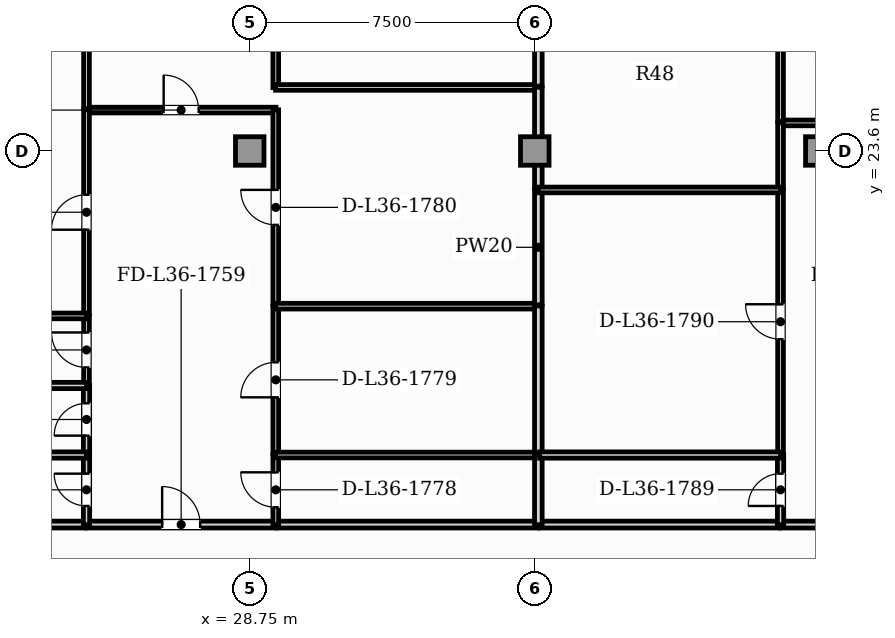
"""IFC4 building model, lengths in metres.
Left out: names, types, materials, properties, quantities, classifications, styles, units other than length and angle.
Written with IfcOpenShell. Run it as: python <this file> out.ifc"""

import sys

from ifc_helpers import new_model, si_unit, direction, frame, frame_2d, origin, origin_2d, place, context, subcontext, project, spatial, rectangle, extrude, element, fill, save


model = new_model("IFC4")
c1 = context("Model", 3, precision=1e-05, world=origin(), true_north=direction((0.0, 1.0)))
c2 = subcontext(c1, "Body", "Model", "MODEL_VIEW")
j1 = project(units=[si_unit("LENGTHUNIT", "METRE"), si_unit("PLANEANGLEUNIT", "RADIAN")], contexts=[c1])
p1 = place(None, origin())
s1 = spatial("IfcSite", under=j1, at=p1, CompositionType="ELEMENT")
p2 = place(p1, origin())
s2 = spatial("IfcBuilding", under=s1, at=p2, CompositionType="ELEMENT")
p3 = place(p2, frame((0.0, 0.0, 149.05)))
s3 = spatial("IfcBuildingStorey", under=s2, at=p3, CompositionType="ELEMENT", Elevation=149.05)
for number, where, z_axis, x_axis in (
    (1, (28.75, 23.6, 0.0), (0.0, 0.0, 1.0), (1.0, 0.0, 0.0)),
    (2, (36.25, 23.6, 0.0), (0.0, 0.0, 1.0), (1.0, 0.0, 0.0)),
    (3, (43.75, 23.6, 0.0), (0.0, 0.0, 1.0), (1.0, 0.0, 0.0)),
):
    element("IfcColumn", number, at=place(p3, frame(where, z_axis=z_axis, x_axis=x_axis)), inside=s3, PredefinedType="COLUMN", context=c2, shape_type="SweptSolid", body=[
        extrude(rectangle(XDim=0.75, YDim=0.75, at=origin_2d()), origin(), (0.0, 0.0, 1.0), 3.85),
    ])
p4 = place(p3, frame((24.45, 13.77, 0.0), z_axis=(0.0, 0.0, 1.0), x_axis=(1.0, 0.0, 0.0)))
e4 = element("IfcWall", 4, at=p4, inside=s3, PredefinedType="PARTITIONING", context=c2, shape_type="SweptSolid", body=[
    extrude(rectangle(XDim=4.99, YDim=0.18, at=frame_2d((2.495, 0.0))), origin(), (0.0, 0.0, 1.0), 3.63),
])
p5 = place(p4, frame((1.995, 0.0, 0.0)))
e5 = element("IfcOpeningElement", 5, at=p5, cuts=e4, PredefinedType="OPENING", context=c2, shape_type="SweptSolid", body=[
    extrude(rectangle(XDim=1.0, YDim=2.15, at=frame_2d((0.5, 1.075))), frame((0.0, 0.1, 0.0), z_axis=(0.0, -1.0, 0.0), x_axis=(1.0, 0.0, 0.0)), (0.0, 0.0, 1.0), 0.2),
])
p6 = place(p3, frame((17.385, 13.77, 0.0), z_axis=(0.0, 0.0, 1.0), x_axis=(1.0, 0.0, 0.0)))
e6 = element("IfcWall", 6, at=p6, inside=s3, PredefinedType="PARTITIONING", context=c2, shape_type="SweptSolid", body=[
    extrude(rectangle(XDim=7.035, YDim=0.18, at=frame_2d((3.518, 0.0))), origin(), (0.0, 0.0, 1.0), 3.63),
])
p7 = place(p3, frame((29.47, 13.77, 0.0), z_axis=(0.0, 0.0, 1.0), x_axis=(1.0, 0.0, 0.0)))
e7 = element("IfcWall", 7, at=p7, inside=s3, PredefinedType="PARTITIONING", context=c2, shape_type="SweptSolid", body=[
    extrude(rectangle(XDim=6.879, YDim=0.18, at=frame_2d((3.439, 0.0))), origin(), (0.0, 0.0, 1.0), 3.63),
])
p8 = place(p3, frame((42.712, 13.77, 0.0), z_axis=(0.0, 0.0, 1.0), x_axis=(1.0, 0.0, 0.0)))
e8 = element("IfcWall", 8, at=p8, inside=s3, PredefinedType="PARTITIONING", context=c2, shape_type="SweptSolid", body=[
    extrude(rectangle(XDim=4.99, YDim=0.18, at=frame_2d((2.495, 0.0))), origin(), (0.0, 0.0, 1.0), 3.63),
])
p9 = place(p8, frame((1.995, 0.0, 0.0)))
e9 = element("IfcOpeningElement", 9, at=p9, cuts=e8, PredefinedType="OPENING", context=c2, shape_type="SweptSolid", body=[
    extrude(rectangle(XDim=1.0, YDim=2.15, at=frame_2d((0.5, 1.075))), frame((0.0, 0.1, 0.0), z_axis=(0.0, -1.0, 0.0), x_axis=(1.0, 0.0, 0.0)), (0.0, 0.0, 1.0), 0.2),
])
p10 = place(p3, frame((36.379, 13.77, 0.0), z_axis=(0.0, 0.0, 1.0), x_axis=(1.0, 0.0, 0.0)))
e10 = element("IfcWall", 10, at=p10, inside=s3, PredefinedType="PARTITIONING", context=c2, shape_type="SweptSolid", body=[
    extrude(rectangle(XDim=6.303, YDim=0.18, at=frame_2d((3.151, 0.0))), origin(), (0.0, 0.0, 1.0), 3.63),
])
p11 = place(p3, frame((24.45, 24.676, 0.0), z_axis=(0.0, 0.0, 1.0), x_axis=(1.0, 0.0, 0.0)))
e11 = element("IfcWall", 11, at=p11, inside=s3, PredefinedType="PARTITIONING", context=c2, shape_type="SweptSolid", body=[
    extrude(rectangle(XDim=4.99, YDim=0.15, at=frame_2d((2.495, 0.0))), origin(), (0.0, 0.0, 1.0), 3.63),
])
p12 = place(p11, frame((2.035, 0.0, 0.0)))
e12 = element("IfcOpeningElement", 12, at=p12, cuts=e11, PredefinedType="OPENING", context=c2, shape_type="SweptSolid", body=[
    extrude(rectangle(XDim=0.92, YDim=2.1, at=frame_2d((0.46, 1.05))), frame((0.0, 0.085, 0.0), z_axis=(0.0, -1.0, 0.0), x_axis=(1.0, 0.0, 0.0)), (0.0, 0.0, 1.0), 0.17),
])
p13 = place(p3, frame((24.455, 13.765, 0.0), z_axis=(0.0, 0.0, 1.0), x_axis=(0.0, 1.0, 0.0)))
e13 = element("IfcWall", 13, at=p13, inside=s3, PredefinedType="PLUMBINGWALL", context=c2, shape_type="SweptSolid", body=[
    extrude(rectangle(XDim=1.84, YDim=0.165, at=frame_2d((0.92, 0.0))), origin(), (0.0, 0.0, 1.0), 3.63),
])
p14 = place(p13, frame((0.495, 0.0, 0.0)))
e14 = element("IfcOpeningElement", 14, at=p14, cuts=e13, PredefinedType="OPENING", context=c2, shape_type="SweptSolid", body=[
    extrude(rectangle(XDim=0.85, YDim=2.1, at=frame_2d((0.425, 1.05))), frame((0.0, 0.093, 0.0), z_axis=(0.0, -1.0, 0.0), x_axis=(1.0, 0.0, 0.0)), (0.0, 0.0, 1.0), 0.185),
])
p15 = place(p3, frame((24.455, 15.635, 0.0), z_axis=(0.0, 0.0, 1.0), x_axis=(0.0, 1.0, 0.0)))
e15 = element("IfcWall", 15, at=p15, inside=s3, PredefinedType="PLUMBINGWALL", context=c2, shape_type="SweptSolid", body=[
    extrude(rectangle(XDim=1.8, YDim=0.165, at=frame_2d((0.9, 0.0))), origin(), (0.0, 0.0, 1.0), 3.63),
])
p16 = place(p15, frame((0.475, 0.0, 0.0)))
e16 = element("IfcOpeningElement", 16, at=p16, cuts=e15, PredefinedType="OPENING", context=c2, shape_type="SweptSolid", body=[
    extrude(rectangle(XDim=0.85, YDim=2.1, at=frame_2d((0.425, 1.05))), frame((0.0, 0.093, 0.0), z_axis=(0.0, -1.0, 0.0), x_axis=(1.0, 0.0, 0.0)), (0.0, 0.0, 1.0), 0.185),
])
p17 = place(p3, frame((24.455, 17.465, 0.0), z_axis=(0.0, 0.0, 1.0), x_axis=(0.0, 1.0, 0.0)))
e17 = element("IfcWall", 17, at=p17, inside=s3, PredefinedType="PARTITIONING", context=c2, shape_type="SweptSolid", body=[
    extrude(rectangle(XDim=1.8, YDim=0.15, at=frame_2d((0.9, 0.0))), origin(), (0.0, 0.0, 1.0), 3.63),
])
p18 = place(p17, frame((0.44, 0.0, 0.0)))
e18 = element("IfcOpeningElement", 18, at=p18, cuts=e17, PredefinedType="OPENING", context=c2, shape_type="SweptSolid", body=[
    extrude(rectangle(XDim=0.92, YDim=2.1, at=frame_2d((0.46, 1.05))), frame((0.0, 0.085, 0.0), z_axis=(0.0, -1.0, 0.0), x_axis=(1.0, 0.0, 0.0)), (0.0, 0.0, 1.0), 0.17),
])
p19 = place(p3, frame((24.455, 19.295, 0.0), z_axis=(0.0, 0.0, 1.0), x_axis=(0.0, 1.0, 0.0)))
e19 = element("IfcWall", 19, at=p19, inside=s3, PredefinedType="PARTITIONING", context=c2, shape_type="SweptSolid", body=[
    extrude(rectangle(XDim=5.386, YDim=0.15, at=frame_2d((2.693, 0.0))), origin(), (0.0, 0.0, 1.0), 3.63),
])
p20 = place(p19, frame((2.233, 0.0, 0.0)))
e20 = element("IfcOpeningElement", 20, at=p20, cuts=e19, PredefinedType="OPENING", context=c2, shape_type="SweptSolid", body=[
    extrude(rectangle(XDim=0.92, YDim=2.1, at=frame_2d((0.46, 1.05))), frame((0.0, 0.085, 0.0), z_axis=(0.0, -1.0, 0.0), x_axis=(1.0, 0.0, 0.0)), (0.0, 0.0, 1.0), 0.17),
])
p21 = place(p3, frame((29.435, 13.765, 0.0), z_axis=(0.0, 0.0, 1.0), x_axis=(0.0, 1.0, 0.0)))
e21 = element("IfcWall", 21, at=p21, inside=s3, PredefinedType="PARTITIONING", context=c2, shape_type="SweptSolid", body=[
    extrude(rectangle(XDim=1.84, YDim=0.15, at=frame_2d((0.92, 0.0))), origin(), (0.0, 0.0, 1.0), 3.63),
])
p22 = place(p21, frame((0.46, 0.0, 0.0)))
e22 = element("IfcOpeningElement", 22, at=p22, cuts=e21, PredefinedType="OPENING", context=c2, shape_type="SweptSolid", body=[
    extrude(rectangle(XDim=0.92, YDim=2.1, at=frame_2d((0.46, 1.05))), frame((0.0, 0.085, 0.0), z_axis=(0.0, -1.0, 0.0), x_axis=(1.0, 0.0, 0.0)), (0.0, 0.0, 1.0), 0.17),
])
p23 = place(p3, frame((29.435, 15.635, 0.0), z_axis=(0.0, 0.0, 1.0), x_axis=(0.0, 1.0, 0.0)))
e23 = element("IfcWall", 23, at=p23, inside=s3, PredefinedType="PARTITIONING", context=c2, shape_type="SweptSolid", body=[
    extrude(rectangle(XDim=3.886, YDim=0.15, at=frame_2d((1.943, 0.0))), origin(), (0.0, 0.0, 1.0), 3.63),
])
p24 = place(p23, frame((1.483, 0.0, 0.0)))
e24 = element("IfcOpeningElement", 24, at=p24, cuts=e23, PredefinedType="OPENING", context=c2, shape_type="SweptSolid", body=[
    extrude(rectangle(XDim=0.92, YDim=2.1, at=frame_2d((0.46, 1.05))), frame((0.0, 0.085, 0.0), z_axis=(0.0, -1.0, 0.0), x_axis=(1.0, 0.0, 0.0)), (0.0, 0.0, 1.0), 0.17),
])
p25 = place(p3, frame((29.435, 19.552, 0.0), z_axis=(0.0, 0.0, 1.0), x_axis=(0.0, 1.0, 0.0)))
e25 = element("IfcWall", 25, at=p25, inside=s3, PredefinedType="PARTITIONING", context=c2, shape_type="SweptSolid", body=[
    extrude(rectangle(XDim=5.13, YDim=0.15, at=frame_2d((2.565, 0.0))), origin(), (0.0, 0.0, 1.0), 3.63),
])
p26 = place(p25, frame((2.105, 0.0, 0.0)))
e26 = element("IfcOpeningElement", 26, at=p26, cuts=e25, PredefinedType="OPENING", context=c2, shape_type="SweptSolid", body=[
    extrude(rectangle(XDim=0.92, YDim=2.1, at=frame_2d((0.46, 1.05))), frame((0.0, 0.085, 0.0), z_axis=(0.0, -1.0, 0.0), x_axis=(1.0, 0.0, 0.0)), (0.0, 0.0, 1.0), 0.17),
])
p27 = place(p3, frame((24.455, 24.711, 0.0), z_axis=(0.0, 0.0, 1.0), x_axis=(0.0, 1.0, 0.0)))
e27 = element("IfcWall", 27, at=p27, inside=s3, PredefinedType="PARTITIONING", context=c2, shape_type="SweptSolid", body=[
    extrude(rectangle(XDim=5.772, YDim=0.15, at=frame_2d((2.886, 0.0))), origin(), (0.0, 0.0, 1.0), 3.63),
])
p28 = place(p27, frame((2.426, 0.0, 0.0)))
e28 = element("IfcOpeningElement", 28, at=p28, cuts=e27, PredefinedType="OPENING", context=c2, shape_type="SweptSolid", body=[
    extrude(rectangle(XDim=0.92, YDim=2.1, at=frame_2d((0.46, 1.05))), frame((0.0, 0.085, 0.0), z_axis=(0.0, -1.0, 0.0), x_axis=(1.0, 0.0, 0.0)), (0.0, 0.0, 1.0), 0.17),
])
p29 = place(p3, frame((29.435, 25.267, 0.0), z_axis=(0.0, 0.0, 1.0), x_axis=(0.0, 1.0, 0.0)))
e29 = element("IfcWall", 29, at=p29, inside=s3, PredefinedType="PARTITIONING", context=c2, shape_type="SweptSolid", body=[
    extrude(rectangle(XDim=8.238, YDim=0.15, at=frame_2d((4.119, 0.0))), origin(), (0.0, 0.0, 1.0), 3.63),
])
p30 = place(p29, frame((4.895, 0.0, 0.0)))
e30 = element("IfcOpeningElement", 30, at=p30, cuts=e29, PredefinedType="OPENING", context=c2, shape_type="SweptSolid", body=[
    extrude(rectangle(XDim=0.92, YDim=2.1, at=frame_2d((0.46, 1.05))), frame((0.0, 0.085, 0.0), z_axis=(0.0, -1.0, 0.0), x_axis=(1.0, 0.0, 0.0)), (0.0, 0.0, 1.0), 0.17),
])
for number, where, z_axis, x_axis in (
    (31, (17.385, 15.6, 0.0), (0.0, 0.0, 1.0), (1.0, 0.0, 0.0)),
    (32, (17.385, 17.43, 0.0), (0.0, 0.0, 1.0), (1.0, 0.0, 0.0)),
):
    element("IfcWall", number, at=place(p3, frame(where, z_axis=z_axis, x_axis=x_axis)), inside=s3, PredefinedType="PLUMBINGWALL", context=c2, shape_type="SweptSolid", body=[
        extrude(rectangle(XDim=7.075, YDim=0.165, at=frame_2d((3.538, 0.0))), origin(), (0.0, 0.0, 1.0), 3.63),
    ])
p31 = place(p3, frame((17.385, 19.26, 0.0), z_axis=(0.0, 0.0, 1.0), x_axis=(1.0, 0.0, 0.0)))
e33 = element("IfcWall", 33, at=p31, inside=s3, PredefinedType="PARTITIONING", context=c2, shape_type="SweptSolid", body=[
    extrude(rectangle(XDim=7.075, YDim=0.15, at=frame_2d((3.538, 0.0))), origin(), (0.0, 0.0, 1.0), 3.63),
])
p32 = place(p3, frame((29.43, 15.6, 0.0), z_axis=(0.0, 0.0, 1.0), x_axis=(1.0, 0.0, 0.0)))
e34 = element("IfcWall", 34, at=p32, inside=s3, PredefinedType="PARTITIONING", context=c2, shape_type="SweptSolid", body=[
    extrude(rectangle(XDim=6.919, YDim=0.15, at=frame_2d((3.459, 0.0))), origin(), (0.0, 0.0, 1.0), 3.63),
])
p33 = place(p3, frame((36.344, 13.765, 0.0), z_axis=(0.0, 0.0, 1.0), x_axis=(0.0, 1.0, 0.0)))
e35 = element("IfcWall", 35, at=p33, inside=s3, PredefinedType="PARTITIONING", context=c2, shape_type="SweptSolid", body=[
    extrude(rectangle(XDim=1.84, YDim=0.2, at=frame_2d((0.92, 0.0))), origin(), (0.0, 0.0, 1.0), 3.177),
])
p34 = place(p3, frame((29.43, 19.517, 0.0), z_axis=(0.0, 0.0, 1.0), x_axis=(1.0, 0.0, 0.0)))
e36 = element("IfcWall", 36, at=p34, inside=s3, PredefinedType="PARTITIONING", context=c2, shape_type="SweptSolid", body=[
    extrude(rectangle(XDim=6.919, YDim=0.15, at=frame_2d((3.459, 0.0))), origin(), (0.0, 0.0, 1.0), 3.63),
])
p35 = place(p3, frame((36.344, 15.635, 0.0), z_axis=(0.0, 0.0, 1.0), x_axis=(0.0, 1.0, 0.0)))
e37 = element("IfcWall", 37, at=p35, inside=s3, PredefinedType="PARTITIONING", context=c2, shape_type="SweptSolid", body=[
    extrude(rectangle(XDim=3.886, YDim=0.2, at=frame_2d((1.943, 0.0))), origin(), (0.0, 0.0, 1.0), 3.177),
])
p36 = place(p3, frame((29.43, 25.272, 0.0), z_axis=(0.0, 0.0, 1.0), x_axis=(1.0, 0.0, 0.0)))
e38 = element("IfcWall", 38, at=p36, inside=s3, PredefinedType="PARTITIONING", context=c2, shape_type="SweptSolid", body=[
    extrude(rectangle(XDim=6.919, YDim=0.15, at=frame_2d((3.459, 0.0))), origin(), (0.0, 0.0, 1.0), 3.63),
])
p37 = place(p3, frame((36.344, 19.552, 0.0), z_axis=(0.0, 0.0, 1.0), x_axis=(0.0, 1.0, 0.0)))
e39 = element("IfcWall", 39, at=p37, inside=s3, PredefinedType="PARTITIONING", context=c2, shape_type="SweptSolid", body=[
    extrude(rectangle(XDim=3.028, YDim=0.2, at=frame_2d((1.514, 0.0))), origin(), (0.0, 0.0, 1.0), 3.177),
])
p38 = place(p3, frame((36.344, 22.61, 0.0), z_axis=(0.0, 0.0, 1.0), x_axis=(0.0, 1.0, 0.0)))
e40 = element("IfcWall", 40, at=p38, inside=s3, PredefinedType="PARTITIONING", context=c2, shape_type="SweptSolid", body=[
    extrude(rectangle(XDim=2.667, YDim=0.2, at=frame_2d((1.334, 0.0))), origin(), (0.0, 0.0, 1.0), 3.177),
])
p39 = place(p3, frame((36.344, 25.307, 0.0), z_axis=(0.0, 0.0, 1.0), x_axis=(0.0, 1.0, 0.0)))
e41 = element("IfcWall", 41, at=p39, inside=s3, PredefinedType="PARTITIONING", context=c2, shape_type="SweptSolid", body=[
    extrude(rectangle(XDim=8.158, YDim=0.2, at=frame_2d((4.079, 0.0))), origin(), (0.0, 0.0, 1.0), 3.177),
])
p40 = place(p3, frame((42.712, 24.338, 0.0), z_axis=(0.0, 0.0, 1.0), x_axis=(1.0, 0.0, 0.0)))
e42 = element("IfcWall", 42, at=p40, inside=s3, PredefinedType="PARTITIONING", context=c2, shape_type="SweptSolid", body=[
    extrude(rectangle(XDim=4.99, YDim=0.15, at=frame_2d((2.495, 0.0))), origin(), (0.0, 0.0, 1.0), 3.63),
])
p41 = place(p40, frame((2.035, 0.0, 0.0)))
e43 = element("IfcOpeningElement", 43, at=p41, cuts=e42, PredefinedType="OPENING", context=c2, shape_type="SweptSolid", body=[
    extrude(rectangle(XDim=0.92, YDim=2.1, at=frame_2d((0.46, 1.05))), frame((0.0, 0.085, 0.0), z_axis=(0.0, -1.0, 0.0), x_axis=(1.0, 0.0, 0.0)), (0.0, 0.0, 1.0), 0.17),
])
p42 = place(p3, frame((42.717, 13.765, 0.0), z_axis=(0.0, 0.0, 1.0), x_axis=(0.0, 1.0, 0.0)))
e44 = element("IfcWall", 44, at=p42, inside=s3, PredefinedType="PLUMBINGWALL", context=c2, shape_type="SweptSolid", body=[
    extrude(rectangle(XDim=1.84, YDim=0.165, at=frame_2d((0.92, 0.0))), origin(), (0.0, 0.0, 1.0), 3.63),
])
p43 = place(p42, frame((0.495, 0.0, 0.0)))
e45 = element("IfcOpeningElement", 45, at=p43, cuts=e44, PredefinedType="OPENING", context=c2, shape_type="SweptSolid", body=[
    extrude(rectangle(XDim=0.85, YDim=2.1, at=frame_2d((0.425, 1.05))), frame((0.0, 0.093, 0.0), z_axis=(0.0, -1.0, 0.0), x_axis=(1.0, 0.0, 0.0)), (0.0, 0.0, 1.0), 0.185),
])
p44 = place(p3, frame((42.717, 15.635, 0.0), z_axis=(0.0, 0.0, 1.0), x_axis=(0.0, 1.0, 0.0)))
e46 = element("IfcWall", 46, at=p44, inside=s3, PredefinedType="PARTITIONING", context=c2, shape_type="SweptSolid", body=[
    extrude(rectangle(XDim=6.945, YDim=0.15, at=frame_2d((3.472, 0.0))), origin(), (0.0, 0.0, 1.0), 3.63),
])
p45 = place(p44, frame((3.012, 0.0, 0.0)))
e47 = element("IfcOpeningElement", 47, at=p45, cuts=e46, PredefinedType="OPENING", context=c2, shape_type="SweptSolid", body=[
    extrude(rectangle(XDim=0.92, YDim=2.1, at=frame_2d((0.46, 1.05))), frame((0.0, 0.085, 0.0), z_axis=(0.0, -1.0, 0.0), x_axis=(1.0, 0.0, 0.0)), (0.0, 0.0, 1.0), 0.17),
])
p46 = place(p3, frame((42.717, 22.61, 0.0), z_axis=(0.0, 0.0, 1.0), x_axis=(0.0, 1.0, 0.0)))
e48 = element("IfcWall", 48, at=p46, inside=s3, PredefinedType="PARTITIONING", context=c2, shape_type="SweptSolid", body=[
    extrude(rectangle(XDim=1.734, YDim=0.15, at=frame_2d((0.867, 0.0))), origin(), (0.0, 0.0, 1.0), 3.63),
])
p47 = place(p3, frame((42.717, 24.374, 0.0), z_axis=(0.0, 0.0, 1.0), x_axis=(0.0, 1.0, 0.0)))
e49 = element("IfcWall", 49, at=p47, inside=s3, PredefinedType="PARTITIONING", context=c2, shape_type="SweptSolid", body=[
    extrude(rectangle(XDim=9.131, YDim=0.15, at=frame_2d((4.566, 0.0))), origin(), (0.0, 0.0, 1.0), 3.63),
])
p48 = place(p47, frame((5.476, 0.0, 0.0)))
e50 = element("IfcOpeningElement", 50, at=p48, cuts=e49, PredefinedType="OPENING", context=c2, shape_type="SweptSolid", body=[
    extrude(rectangle(XDim=0.92, YDim=2.1, at=frame_2d((0.46, 1.05))), frame((0.0, 0.085, 0.0), z_axis=(0.0, -1.0, 0.0), x_axis=(1.0, 0.0, 0.0)), (0.0, 0.0, 1.0), 0.17),
])
p49 = place(p3, frame((36.379, 15.6, 0.0), z_axis=(0.0, 0.0, 1.0), x_axis=(1.0, 0.0, 0.0)))
e51 = element("IfcWall", 51, at=p49, inside=s3, PredefinedType="PLUMBINGWALL", context=c2, shape_type="SweptSolid", body=[
    extrude(rectangle(XDim=6.343, YDim=0.165, at=frame_2d((3.171, 0.0))), origin(), (0.0, 0.0, 1.0), 3.63),
])
p50 = place(p3, frame((36.339, 22.575, 0.0), z_axis=(0.0, 0.0, 1.0), x_axis=(1.0, 0.0, 0.0)))
e52 = element("IfcWall", 52, at=p50, inside=s3, PredefinedType="PARTITIONING", context=c2, shape_type="SweptSolid", body=[
    extrude(rectangle(XDim=6.383, YDim=0.15, at=frame_2d((3.191, 0.0))), origin(), (0.0, 0.0, 1.0), 3.63),
])
p51 = place(p5, origin())
e53 = element("IfcDoor", 53, at=p51, inside=s3, OperationType="SINGLE_SWING_LEFT", PredefinedType="DOOR", context=c2, shape_type="SweptSolid", body=[
    extrude(rectangle(XDim=1.0, YDim=2.15, at=frame_2d((0.5, 1.075))), frame((0.0, 0.025, 0.0), z_axis=(0.0, -1.0, 0.0), x_axis=(1.0, 0.0, 0.0)), (0.0, 0.0, 1.0), 0.05),
])
fill(e5, e53)
p52 = place(p12, origin())
e54 = element("IfcDoor", 54, at=p52, inside=s3, OperationType="SINGLE_SWING_LEFT", PredefinedType="DOOR", context=c2, shape_type="SweptSolid", body=[
    extrude(rectangle(XDim=0.92, YDim=2.1, at=frame_2d((0.46, 1.05))), frame((0.0, 0.025, 0.0), z_axis=(0.0, -1.0, 0.0), x_axis=(1.0, 0.0, 0.0)), (0.0, 0.0, 1.0), 0.05),
])
fill(e12, e54)
p53 = place(p14, origin())
e55 = element("IfcDoor", 55, at=p53, inside=s3, OperationType="SINGLE_SWING_RIGHT", PredefinedType="DOOR", context=c2, shape_type="SweptSolid", body=[
    extrude(rectangle(XDim=0.85, YDim=2.1, at=frame_2d((0.425, 1.05))), frame((0.0, 0.025, 0.0), z_axis=(0.0, -1.0, 0.0), x_axis=(1.0, 0.0, 0.0)), (0.0, 0.0, 1.0), 0.05),
])
fill(e14, e55)
p54 = place(p16, origin())
e56 = element("IfcDoor", 56, at=p54, inside=s3, OperationType="SINGLE_SWING_LEFT", PredefinedType="DOOR", context=c2, shape_type="SweptSolid", body=[
    extrude(rectangle(XDim=0.85, YDim=2.1, at=frame_2d((0.425, 1.05))), frame((0.0, 0.025, 0.0), z_axis=(0.0, -1.0, 0.0), x_axis=(1.0, 0.0, 0.0)), (0.0, 0.0, 1.0), 0.05),
])
fill(e16, e56)
p55 = place(p18, origin())
e57 = element("IfcDoor", 57, at=p55, inside=s3, OperationType="SINGLE_SWING_RIGHT", PredefinedType="DOOR", context=c2, shape_type="SweptSolid", body=[
    extrude(rectangle(XDim=0.92, YDim=2.1, at=frame_2d((0.46, 1.05))), frame((0.0, 0.025, 0.0), z_axis=(0.0, -1.0, 0.0), x_axis=(1.0, 0.0, 0.0)), (0.0, 0.0, 1.0), 0.05),
])
fill(e18, e57)
p56 = place(p20, origin())
e58 = element("IfcDoor", 58, at=p56, inside=s3, OperationType="SINGLE_SWING_LEFT", PredefinedType="DOOR", context=c2, shape_type="SweptSolid", body=[
    extrude(rectangle(XDim=0.92, YDim=2.1, at=frame_2d((0.46, 1.05))), frame((0.0, 0.025, 0.0), z_axis=(0.0, -1.0, 0.0), x_axis=(1.0, 0.0, 0.0)), (0.0, 0.0, 1.0), 0.05),
])
fill(e20, e58)
p57 = place(p22, origin())
e59 = element("IfcDoor", 59, at=p57, inside=s3, OperationType="SINGLE_SWING_RIGHT", PredefinedType="DOOR", context=c2, shape_type="SweptSolid", body=[
    extrude(rectangle(XDim=0.92, YDim=2.1, at=frame_2d((0.46, 1.05))), frame((0.0, 0.025, 0.0), z_axis=(0.0, -1.0, 0.0), x_axis=(1.0, 0.0, 0.0)), (0.0, 0.0, 1.0), 0.05),
])
fill(e22, e59)
p58 = place(p24, origin())
e60 = element("IfcDoor", 60, at=p58, inside=s3, OperationType="SINGLE_SWING_LEFT", PredefinedType="DOOR", context=c2, shape_type="SweptSolid", body=[
    extrude(rectangle(XDim=0.92, YDim=2.1, at=frame_2d((0.46, 1.05))), frame((0.0, 0.025, 0.0), z_axis=(0.0, -1.0, 0.0), x_axis=(1.0, 0.0, 0.0)), (0.0, 0.0, 1.0), 0.05),
])
fill(e24, e60)
p59 = place(p26, origin())
e61 = element("IfcDoor", 61, at=p59, inside=s3, OperationType="SINGLE_SWING_RIGHT", PredefinedType="DOOR", context=c2, shape_type="SweptSolid", body=[
    extrude(rectangle(XDim=0.92, YDim=2.1, at=frame_2d((0.46, 1.05))), frame((0.0, 0.025, 0.0), z_axis=(0.0, -1.0, 0.0), x_axis=(1.0, 0.0, 0.0)), (0.0, 0.0, 1.0), 0.05),
])
fill(e26, e61)
p60 = place(p43, origin())
e62 = element("IfcDoor", 62, at=p60, inside=s3, OperationType="SINGLE_SWING_LEFT", PredefinedType="DOOR", context=c2, shape_type="SweptSolid", body=[
    extrude(rectangle(XDim=0.85, YDim=2.1, at=frame_2d((0.425, 1.05))), frame((0.0, 0.025, 0.0), z_axis=(0.0, -1.0, 0.0), x_axis=(1.0, 0.0, 0.0)), (0.0, 0.0, 1.0), 0.05),
])
fill(e45, e62)
p61 = place(p45, origin())
e63 = element("IfcDoor", 63, at=p61, inside=s3, OperationType="SINGLE_SWING_RIGHT", PredefinedType="DOOR", context=c2, shape_type="SweptSolid", body=[
    extrude(rectangle(XDim=0.92, YDim=2.1, at=frame_2d((0.46, 1.05))), frame((0.0, 0.025, 0.0), z_axis=(0.0, -1.0, 0.0), x_axis=(1.0, 0.0, 0.0)), (0.0, 0.0, 1.0), 0.05),
])
fill(e47, e63)
save(model, sys.argv[1])
